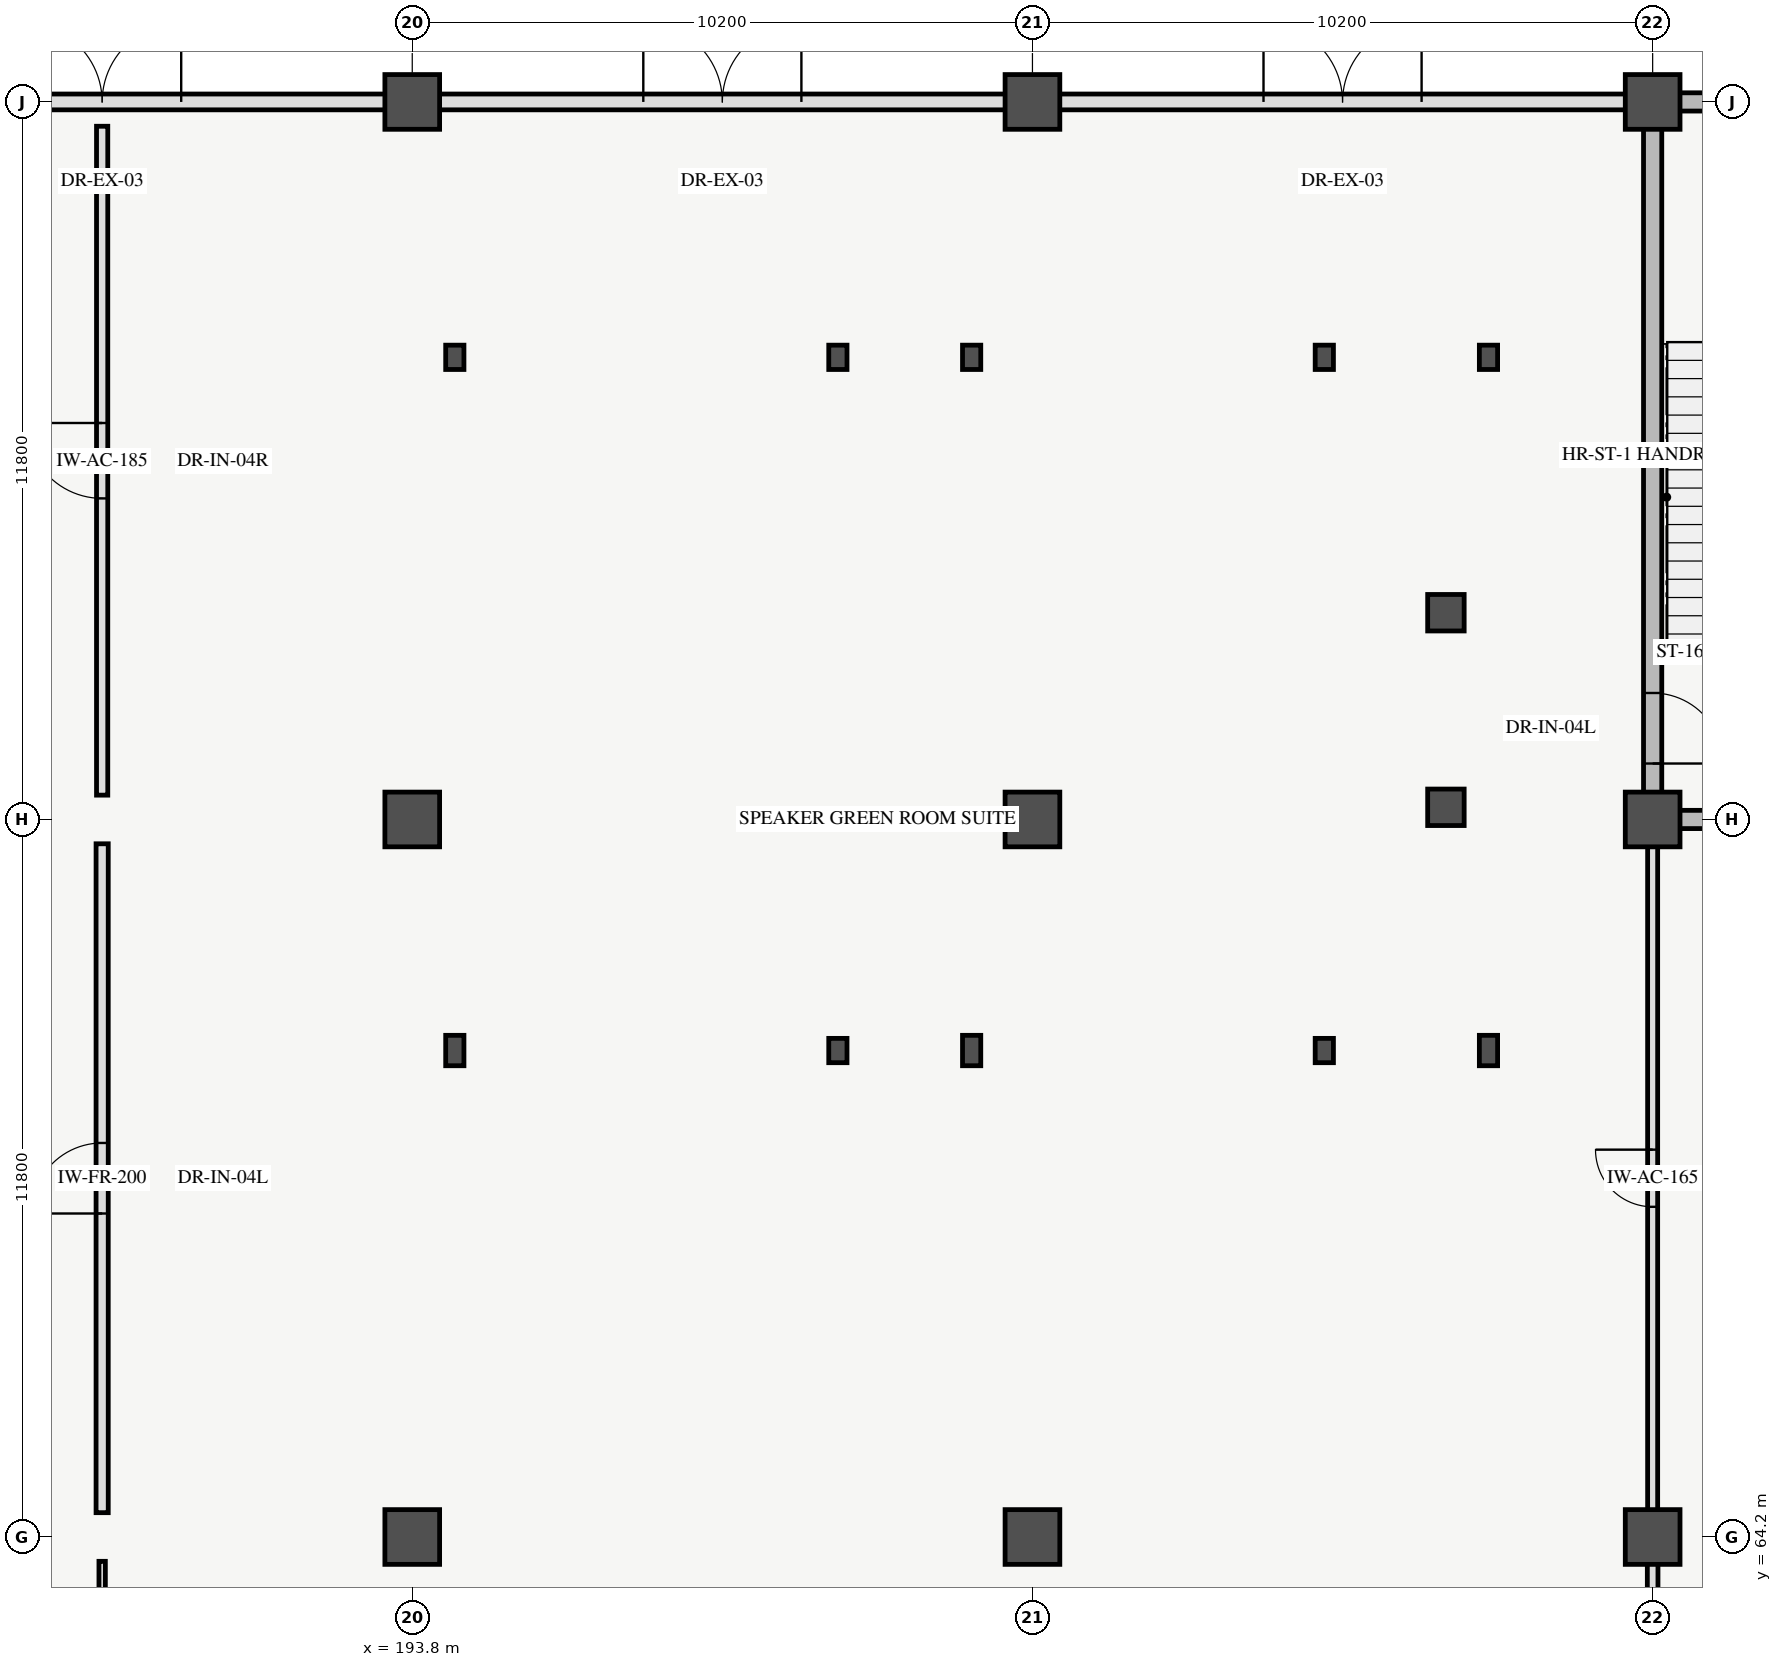
"""IFC4 building model, lengths in metres.
Left out: names, types, materials, properties, quantities, classifications, styles, units other than length and angle.
Written with IfcOpenShell. Run it as: python <this file> out.ifc"""

import sys

from ifc_helpers import new_model, si_unit, direction, frame, frame_2d, origin, origin_2d, place, context, subcontext, project, spatial, rectangle, i_section, extrude, element, fill, save


model = new_model("IFC4")
c1 = context("Model", 3, precision=1e-05, world=origin(), true_north=direction((0.0, 1.0)))
c2 = subcontext(c1, "Body", "Model", "MODEL_VIEW")
j1 = project(units=[si_unit("LENGTHUNIT", "METRE"), si_unit("PLANEANGLEUNIT", "RADIAN")], contexts=[c1])
p1 = place(None, origin())
s1 = spatial("IfcSite", under=j1, at=p1, CompositionType="ELEMENT")
p2 = place(p1, origin())
s2 = spatial("IfcBuilding", under=s1, at=p2, CompositionType="ELEMENT")
p3 = place(p2, origin())
s3 = spatial("IfcBuildingStorey", under=s2, at=p3, CompositionType="ELEMENT", Elevation=0.0)
for number, where, z_axis, x_axis in (
    (1, (193.8, 64.2, 0.0), (0.0, 0.0, 1.0), (1.0, 0.0, 0.0)),
    (2, (193.8, 76.0, 0.0), (0.0, 0.0, 1.0), (1.0, 0.0, 0.0)),
    (3, (193.8, 87.8, 0.0), (0.0, 0.0, 1.0), (1.0, 0.0, 0.0)),
    (4, (204.0, 64.2, 0.0), (0.0, 0.0, 1.0), (1.0, 0.0, 0.0)),
    (5, (204.0, 76.0, 0.0), (0.0, 0.0, 1.0), (1.0, 0.0, 0.0)),
    (6, (204.0, 87.8, 0.0), (0.0, 0.0, 1.0), (1.0, 0.0, 0.0)),
    (7, (214.2, 64.2, 0.0), (0.0, 0.0, 1.0), (1.0, 0.0, 0.0)),
    (8, (214.2, 76.0, 0.0), (0.0, 0.0, 1.0), (1.0, 0.0, 0.0)),
    (9, (214.2, 87.8, 0.0), (0.0, 0.0, 1.0), (1.0, 0.0, 0.0)),
):
    element("IfcColumn", number, at=place(p3, frame(where, z_axis=z_axis, x_axis=x_axis)), inside=s3, PredefinedType="COLUMN", context=c2, shape_type="SweptSolid", body=[
        extrude(rectangle(XDim=0.9, YDim=0.9, at=origin_2d()), origin(), (0.0, 0.0, 1.0), 5.4),
    ])
for number, where, z_axis, x_axis in (
    (10, (210.8, 76.2, 0.0), (0.0, 0.0, 1.0), (1.0, 0.0, 0.0)),
    (11, (210.8, 79.4, 0.0), (0.0, 0.0, 1.0), (1.0, 0.0, 0.0)),
):
    element("IfcColumn", number, at=place(p3, frame(where, z_axis=z_axis, x_axis=x_axis)), inside=s3, PredefinedType="COLUMN", context=c2, shape_type="SweptSolid", body=[
        extrude(rectangle(XDim=0.6, YDim=0.6, at=origin_2d()), origin(), (0.0, 0.0, 1.0), 5.08),
    ])
p4 = place(p3, frame((194.5, 72.2, 0.0), z_axis=(0.0, 0.0, 1.0), x_axis=(1.0, 0.0, 0.0)))
e12 = element("IfcColumn", 12, at=p4, inside=s3, PredefinedType="COLUMN", context=c2, shape_type="SweptSolid", body=[
    extrude(i_section(OverallWidth=0.3, OverallDepth=0.5, WebThickness=0.014, FlangeThickness=0.028, FilletRadius=0.027, at=origin_2d()), origin(), (0.0, 0.0, 1.0), 5.4),
])
p5 = place(p3, frame((194.5, 83.6, 0.0), z_axis=(0.0, 0.0, 1.0), x_axis=(1.0, 0.0, 0.0)))
e13 = element("IfcColumn", 13, at=p5, inside=s3, PredefinedType="COLUMN", context=c2, shape_type="SweptSolid", body=[
    extrude(i_section(OverallWidth=0.3, OverallDepth=0.4, WebThickness=0.013, FlangeThickness=0.024, FilletRadius=0.027, at=origin_2d()), origin(), (0.0, 0.0, 1.0), 5.4),
])
p6 = place(p3, frame((203.0, 72.2, 0.0), z_axis=(0.0, 0.0, 1.0), x_axis=(1.0, 0.0, 0.0)))
e14 = element("IfcColumn", 14, at=p6, inside=s3, PredefinedType="COLUMN", context=c2, shape_type="SweptSolid", body=[
    extrude(i_section(OverallWidth=0.3, OverallDepth=0.5, WebThickness=0.014, FlangeThickness=0.028, FilletRadius=0.027, at=origin_2d()), origin(), (0.0, 0.0, 1.0), 5.4),
])
p7 = place(p3, frame((203.0, 83.6, 0.0), z_axis=(0.0, 0.0, 1.0), x_axis=(1.0, 0.0, 0.0)))
e15 = element("IfcColumn", 15, at=p7, inside=s3, PredefinedType="COLUMN", context=c2, shape_type="SweptSolid", body=[
    extrude(i_section(OverallWidth=0.3, OverallDepth=0.4, WebThickness=0.013, FlangeThickness=0.024, FilletRadius=0.027, at=origin_2d()), origin(), (0.0, 0.0, 1.0), 5.4),
])
p8 = place(p3, frame((211.5, 72.2, 0.0), z_axis=(0.0, 0.0, 1.0), x_axis=(1.0, 0.0, 0.0)))
e16 = element("IfcColumn", 16, at=p8, inside=s3, PredefinedType="COLUMN", context=c2, shape_type="SweptSolid", body=[
    extrude(i_section(OverallWidth=0.3, OverallDepth=0.5, WebThickness=0.014, FlangeThickness=0.028, FilletRadius=0.027, at=origin_2d()), origin(), (0.0, 0.0, 1.0), 5.4),
])
for number, where, z_axis, x_axis in (
    (17, (211.5, 83.6, 0.0), (0.0, 0.0, 1.0), (1.0, 0.0, 0.0)),
    (18, (200.8, 72.2, 0.0), (0.0, 0.0, 1.0), (1.0, 0.0, 0.0)),
    (19, (200.8, 83.6, 0.0), (0.0, 0.0, 1.0), (1.0, 0.0, 0.0)),
    (20, (208.8, 72.2, 0.0), (0.0, 0.0, 1.0), (1.0, 0.0, 0.0)),
    (21, (208.8, 83.6, 0.0), (0.0, 0.0, 1.0), (1.0, 0.0, 0.0)),
):
    element("IfcColumn", number, at=place(p3, frame(where, z_axis=z_axis, x_axis=x_axis)), inside=s3, PredefinedType="COLUMN", context=c2, shape_type="SweptSolid", body=[
        extrude(i_section(OverallWidth=0.3, OverallDepth=0.4, WebThickness=0.013, FlangeThickness=0.024, FilletRadius=0.027, at=origin_2d()), origin(), (0.0, 0.0, 1.0), 5.4),
    ])
p9 = place(p3, frame((183.84, 87.8, 0.0), z_axis=(0.0, 0.0, 1.0), x_axis=(1.0, 0.0, 0.0)))
e22 = element("IfcWall", 22, at=p9, inside=s3, PredefinedType="STANDARD", context=c2, shape_type="SweptSolid", body=[
    extrude(rectangle(XDim=9.72, YDim=0.26, at=frame_2d((4.86, 0.0))), origin(), (0.0, 0.0, 1.0), 3.68),
])
p10 = place(p9, frame((3.56, 0.0, 0.0)))
e23 = element("IfcOpeningElement", 23, at=p10, cuts=e22, PredefinedType="OPENING", context=c2, shape_type="SweptSolid", body=[
    extrude(rectangle(XDim=2.6, YDim=2.4, at=frame_2d((1.3, 1.2))), frame((0.0, 0.14, 0.0), z_axis=(0.0, -1.0, 0.0), x_axis=(1.0, 0.0, 0.0)), (0.0, 0.0, 1.0), 0.28),
])
p11 = place(p3, frame((194.04, 87.8, 0.0), z_axis=(0.0, 0.0, 1.0), x_axis=(1.0, 0.0, 0.0)))
e24 = element("IfcWall", 24, at=p11, inside=s3, PredefinedType="STANDARD", context=c2, shape_type="SweptSolid", body=[
    extrude(rectangle(XDim=9.72, YDim=0.26, at=frame_2d((4.86, 0.0))), origin(), (0.0, 0.0, 1.0), 3.68),
])
p12 = place(p11, frame((3.56, 0.0, 0.0)))
e25 = element("IfcOpeningElement", 25, at=p12, cuts=e24, PredefinedType="OPENING", context=c2, shape_type="SweptSolid", body=[
    extrude(rectangle(XDim=2.6, YDim=2.4, at=frame_2d((1.3, 1.2))), frame((0.0, 0.14, 0.0), z_axis=(0.0, -1.0, 0.0), x_axis=(1.0, 0.0, 0.0)), (0.0, 0.0, 1.0), 0.28),
])
p13 = place(p3, frame((204.24, 87.8, 0.0), z_axis=(0.0, 0.0, 1.0), x_axis=(1.0, 0.0, 0.0)))
e26 = element("IfcWall", 26, at=p13, inside=s3, PredefinedType="STANDARD", context=c2, shape_type="SweptSolid", body=[
    extrude(rectangle(XDim=9.72, YDim=0.26, at=frame_2d((4.86, 0.0))), origin(), (0.0, 0.0, 1.0), 3.68),
])
p14 = place(p13, frame((3.56, 0.0, 0.0)))
e27 = element("IfcOpeningElement", 27, at=p14, cuts=e26, PredefinedType="OPENING", context=c2, shape_type="SweptSolid", body=[
    extrude(rectangle(XDim=2.6, YDim=2.4, at=frame_2d((1.3, 1.2))), frame((0.0, 0.14, 0.0), z_axis=(0.0, -1.0, 0.0), x_axis=(1.0, 0.0, 0.0)), (0.0, 0.0, 1.0), 0.28),
])
for number, where, z_axis, x_axis in (
    (28, (214.2, 76.0, 0.0), (0.0, 0.0, 1.0), (1.0, 0.0, 0.0)),
    (29, (214.2, 87.8, 0.0), (0.0, 0.0, 1.0), (1.0, 0.0, 0.0)),
):
    element("IfcWall", number, at=place(p3, frame(where, z_axis=z_axis, x_axis=x_axis)), inside=s3, PredefinedType="SHEAR", context=c2, shape_type="SweptSolid", body=[
        extrude(rectangle(XDim=10.2, YDim=0.3, at=frame_2d((5.1, 0.0))), origin(), (0.0, 0.0, 1.0), 5.4),
    ])
p15 = place(p3, frame((214.2, 76.0, 0.0), z_axis=(0.0, 0.0, 1.0), x_axis=(0.0, 1.0, 0.0)))
e30 = element("IfcWall", 30, at=p15, inside=s3, PredefinedType="SHEAR", context=c2, shape_type="SweptSolid", body=[
    extrude(rectangle(XDim=11.8, YDim=0.3, at=frame_2d((5.9, 0.0))), origin(), (0.0, 0.0, 1.0), 5.4),
])
p16 = place(p15, frame((0.92, 0.0, 0.0)))
e31 = element("IfcOpeningElement", 31, at=p16, cuts=e30, PredefinedType="OPENING", context=c2, shape_type="SweptSolid", body=[
    extrude(rectangle(XDim=1.16, YDim=2.2, at=frame_2d((0.58, 1.1))), frame((0.0, 0.16, 0.0), z_axis=(0.0, -1.0, 0.0), x_axis=(1.0, 0.0, 0.0)), (0.0, 0.0, 1.0), 0.32),
])
p17 = place(p3, frame((188.7, 52.8, 0.0), z_axis=(0.0, 0.0, 1.0), x_axis=(0.0, 1.0, 0.0)))
e32 = element("IfcWall", 32, at=p17, inside=s3, PredefinedType="PARTITIONING", context=c2, shape_type="SweptSolid", body=[
    extrude(rectangle(XDim=11.0, YDim=0.105, at=frame_2d((5.5, 0.0))), origin(), (0.0, 0.0, 1.0), 4.08),
])
p18 = place(p17, frame((5.02, 0.0, 0.0)))
e33 = element("IfcOpeningElement", 33, at=p18, cuts=e32, PredefinedType="OPENING", context=c2, shape_type="SweptSolid", body=[
    extrude(rectangle(XDim=0.96, YDim=2.1, at=frame_2d((0.48, 1.05))), frame((0.0, 0.062, 0.0), z_axis=(0.0, -1.0, 0.0), x_axis=(1.0, 0.0, 0.0)), (0.0, 0.0, 1.0), 0.125),
])
p19 = place(p3, frame((188.7, 64.6, 0.0), z_axis=(0.0, 0.0, 1.0), x_axis=(0.0, 1.0, 0.0)))
e34 = element("IfcWall", 34, at=p19, inside=s3, PredefinedType="PARTITIONING", context=c2, shape_type="SweptSolid", body=[
    extrude(rectangle(XDim=11.0, YDim=0.2, at=frame_2d((5.5, 0.0))), origin(), (0.0, 0.0, 1.0), 4.08),
])
p20 = place(p19, frame((4.92, 0.0, 0.0)))
e35 = element("IfcOpeningElement", 35, at=p20, cuts=e34, PredefinedType="OPENING", context=c2, shape_type="SweptSolid", body=[
    extrude(rectangle(XDim=1.16, YDim=2.2, at=frame_2d((0.58, 1.1))), frame((0.0, 0.11, 0.0), z_axis=(0.0, -1.0, 0.0), x_axis=(1.0, 0.0, 0.0)), (0.0, 0.0, 1.0), 0.22),
])
p21 = place(p3, frame((188.7, 76.4, 0.0), z_axis=(0.0, 0.0, 1.0), x_axis=(0.0, 1.0, 0.0)))
e36 = element("IfcWall", 36, at=p21, inside=s3, PredefinedType="PARTITIONING", context=c2, shape_type="SweptSolid", body=[
    extrude(rectangle(XDim=11.0, YDim=0.185, at=frame_2d((5.5, 0.0))), origin(), (0.0, 0.0, 1.0), 4.08),
])
p22 = place(p21, frame((4.88, 0.0, 0.0)))
e37 = element("IfcOpeningElement", 37, at=p22, cuts=e36, PredefinedType="OPENING", context=c2, shape_type="SweptSolid", body=[
    extrude(rectangle(XDim=1.24, YDim=2.2, at=frame_2d((0.62, 1.1))), frame((0.0, 0.103, 0.0), z_axis=(0.0, -1.0, 0.0), x_axis=(1.0, 0.0, 0.0)), (0.0, 0.0, 1.0), 0.205),
])
p23 = place(p3, frame((214.2, 52.8, 0.0), z_axis=(0.0, 0.0, 1.0), x_axis=(0.0, 1.0, 0.0)))
e38 = element("IfcWall", 38, at=p23, inside=s3, PredefinedType="PARTITIONING", context=c2, shape_type="SweptSolid", body=[
    extrude(rectangle(XDim=11.0, YDim=0.175, at=frame_2d((5.5, 0.0))), origin(), (0.0, 0.0, 1.0), 4.08),
])
p24 = place(p23, frame((5.06, 0.0, 0.0)))
e39 = element("IfcOpeningElement", 39, at=p24, cuts=e38, PredefinedType="OPENING", context=c2, shape_type="SweptSolid", body=[
    extrude(rectangle(XDim=0.88, YDim=2.08, at=frame_2d((0.44, 1.04))), frame((0.0, 0.097, 0.0), z_axis=(0.0, -1.0, 0.0), x_axis=(1.0, 0.0, 0.0)), (0.0, 0.0, 1.0), 0.195),
])
p25 = place(p3, frame((214.2, 64.6, 0.0), z_axis=(0.0, 0.0, 1.0), x_axis=(0.0, 1.0, 0.0)))
e40 = element("IfcWall", 40, at=p25, inside=s3, PredefinedType="PARTITIONING", context=c2, shape_type="SweptSolid", body=[
    extrude(rectangle(XDim=11.0, YDim=0.165, at=frame_2d((5.5, 0.0))), origin(), (0.0, 0.0, 1.0), 4.08),
])
p26 = place(p25, frame((5.03, 0.0, 0.0)))
e41 = element("IfcOpeningElement", 41, at=p26, cuts=e40, PredefinedType="OPENING", context=c2, shape_type="SweptSolid", body=[
    extrude(rectangle(XDim=0.94, YDim=2.08, at=frame_2d((0.47, 1.04))), frame((0.0, 0.093, 0.0), z_axis=(0.0, -1.0, 0.0), x_axis=(1.0, 0.0, 0.0)), (0.0, 0.0, 1.0), 0.185),
])
p27 = place(p10, origin())
e42 = element("IfcDoor", 42, at=p27, inside=s3, OperationType="DOUBLE_DOOR_SINGLE_SWING", PredefinedType="DOOR", context=c2, shape_type="SweptSolid", body=[
    extrude(rectangle(XDim=2.6, YDim=2.4, at=frame_2d((1.3, 1.2))), frame((0.0, 0.025, 0.0), z_axis=(0.0, -1.0, 0.0), x_axis=(1.0, 0.0, 0.0)), (0.0, 0.0, 1.0), 0.05),
])
fill(e23, e42)
p28 = place(p12, origin())
e43 = element("IfcDoor", 43, at=p28, inside=s3, OperationType="DOUBLE_DOOR_SINGLE_SWING", PredefinedType="DOOR", context=c2, shape_type="SweptSolid", body=[
    extrude(rectangle(XDim=2.6, YDim=2.4, at=frame_2d((1.3, 1.2))), frame((0.0, 0.025, 0.0), z_axis=(0.0, -1.0, 0.0), x_axis=(1.0, 0.0, 0.0)), (0.0, 0.0, 1.0), 0.05),
])
fill(e25, e43)
p29 = place(p14, origin())
e44 = element("IfcDoor", 44, at=p29, inside=s3, OperationType="DOUBLE_DOOR_SINGLE_SWING", PredefinedType="DOOR", context=c2, shape_type="SweptSolid", body=[
    extrude(rectangle(XDim=2.6, YDim=2.4, at=frame_2d((1.3, 1.2))), frame((0.0, 0.025, 0.0), z_axis=(0.0, -1.0, 0.0), x_axis=(1.0, 0.0, 0.0)), (0.0, 0.0, 1.0), 0.05),
])
fill(e27, e44)
p30 = place(p16, origin())
e45 = element("IfcDoor", 45, at=p30, inside=s3, OperationType="SINGLE_SWING_LEFT", PredefinedType="DOOR", context=c2, shape_type="SweptSolid", body=[
    extrude(rectangle(XDim=1.16, YDim=2.2, at=frame_2d((0.58, 1.1))), frame((0.0, 0.025, 0.0), z_axis=(0.0, -1.0, 0.0), x_axis=(1.0, 0.0, 0.0)), (0.0, 0.0, 1.0), 0.05),
])
fill(e31, e45)
p31 = place(p20, origin())
e46 = element("IfcDoor", 46, at=p31, inside=s3, OperationType="SINGLE_SWING_LEFT", PredefinedType="DOOR", context=c2, shape_type="SweptSolid", body=[
    extrude(rectangle(XDim=1.16, YDim=2.2, at=frame_2d((0.58, 1.1))), frame((0.0, 0.025, 0.0), z_axis=(0.0, -1.0, 0.0), x_axis=(1.0, 0.0, 0.0)), (0.0, 0.0, 1.0), 0.05),
])
fill(e35, e46)
p32 = place(p22, origin())
e47 = element("IfcDoor", 47, at=p32, inside=s3, OperationType="SINGLE_SWING_RIGHT", PredefinedType="DOOR", context=c2, shape_type="SweptSolid", body=[
    extrude(rectangle(XDim=1.24, YDim=2.2, at=frame_2d((0.62, 1.1))), frame((0.0, 0.025, 0.0), z_axis=(0.0, -1.0, 0.0), x_axis=(1.0, 0.0, 0.0)), (0.0, 0.0, 1.0), 0.05),
])
fill(e37, e47)
p33 = place(p26, origin())
e48 = element("IfcDoor", 48, at=p33, inside=s3, OperationType="SINGLE_SWING_RIGHT", PredefinedType="DOOR", context=c2, shape_type="SweptSolid", body=[
    extrude(rectangle(XDim=0.94, YDim=2.08, at=frame_2d((0.47, 1.04))), frame((0.0, 0.025, 0.0), z_axis=(0.0, -1.0, 0.0), x_axis=(1.0, 0.0, 0.0)), (0.0, 0.0, 1.0), 0.05),
])
fill(e41, e48)
save(model, sys.argv[1])
